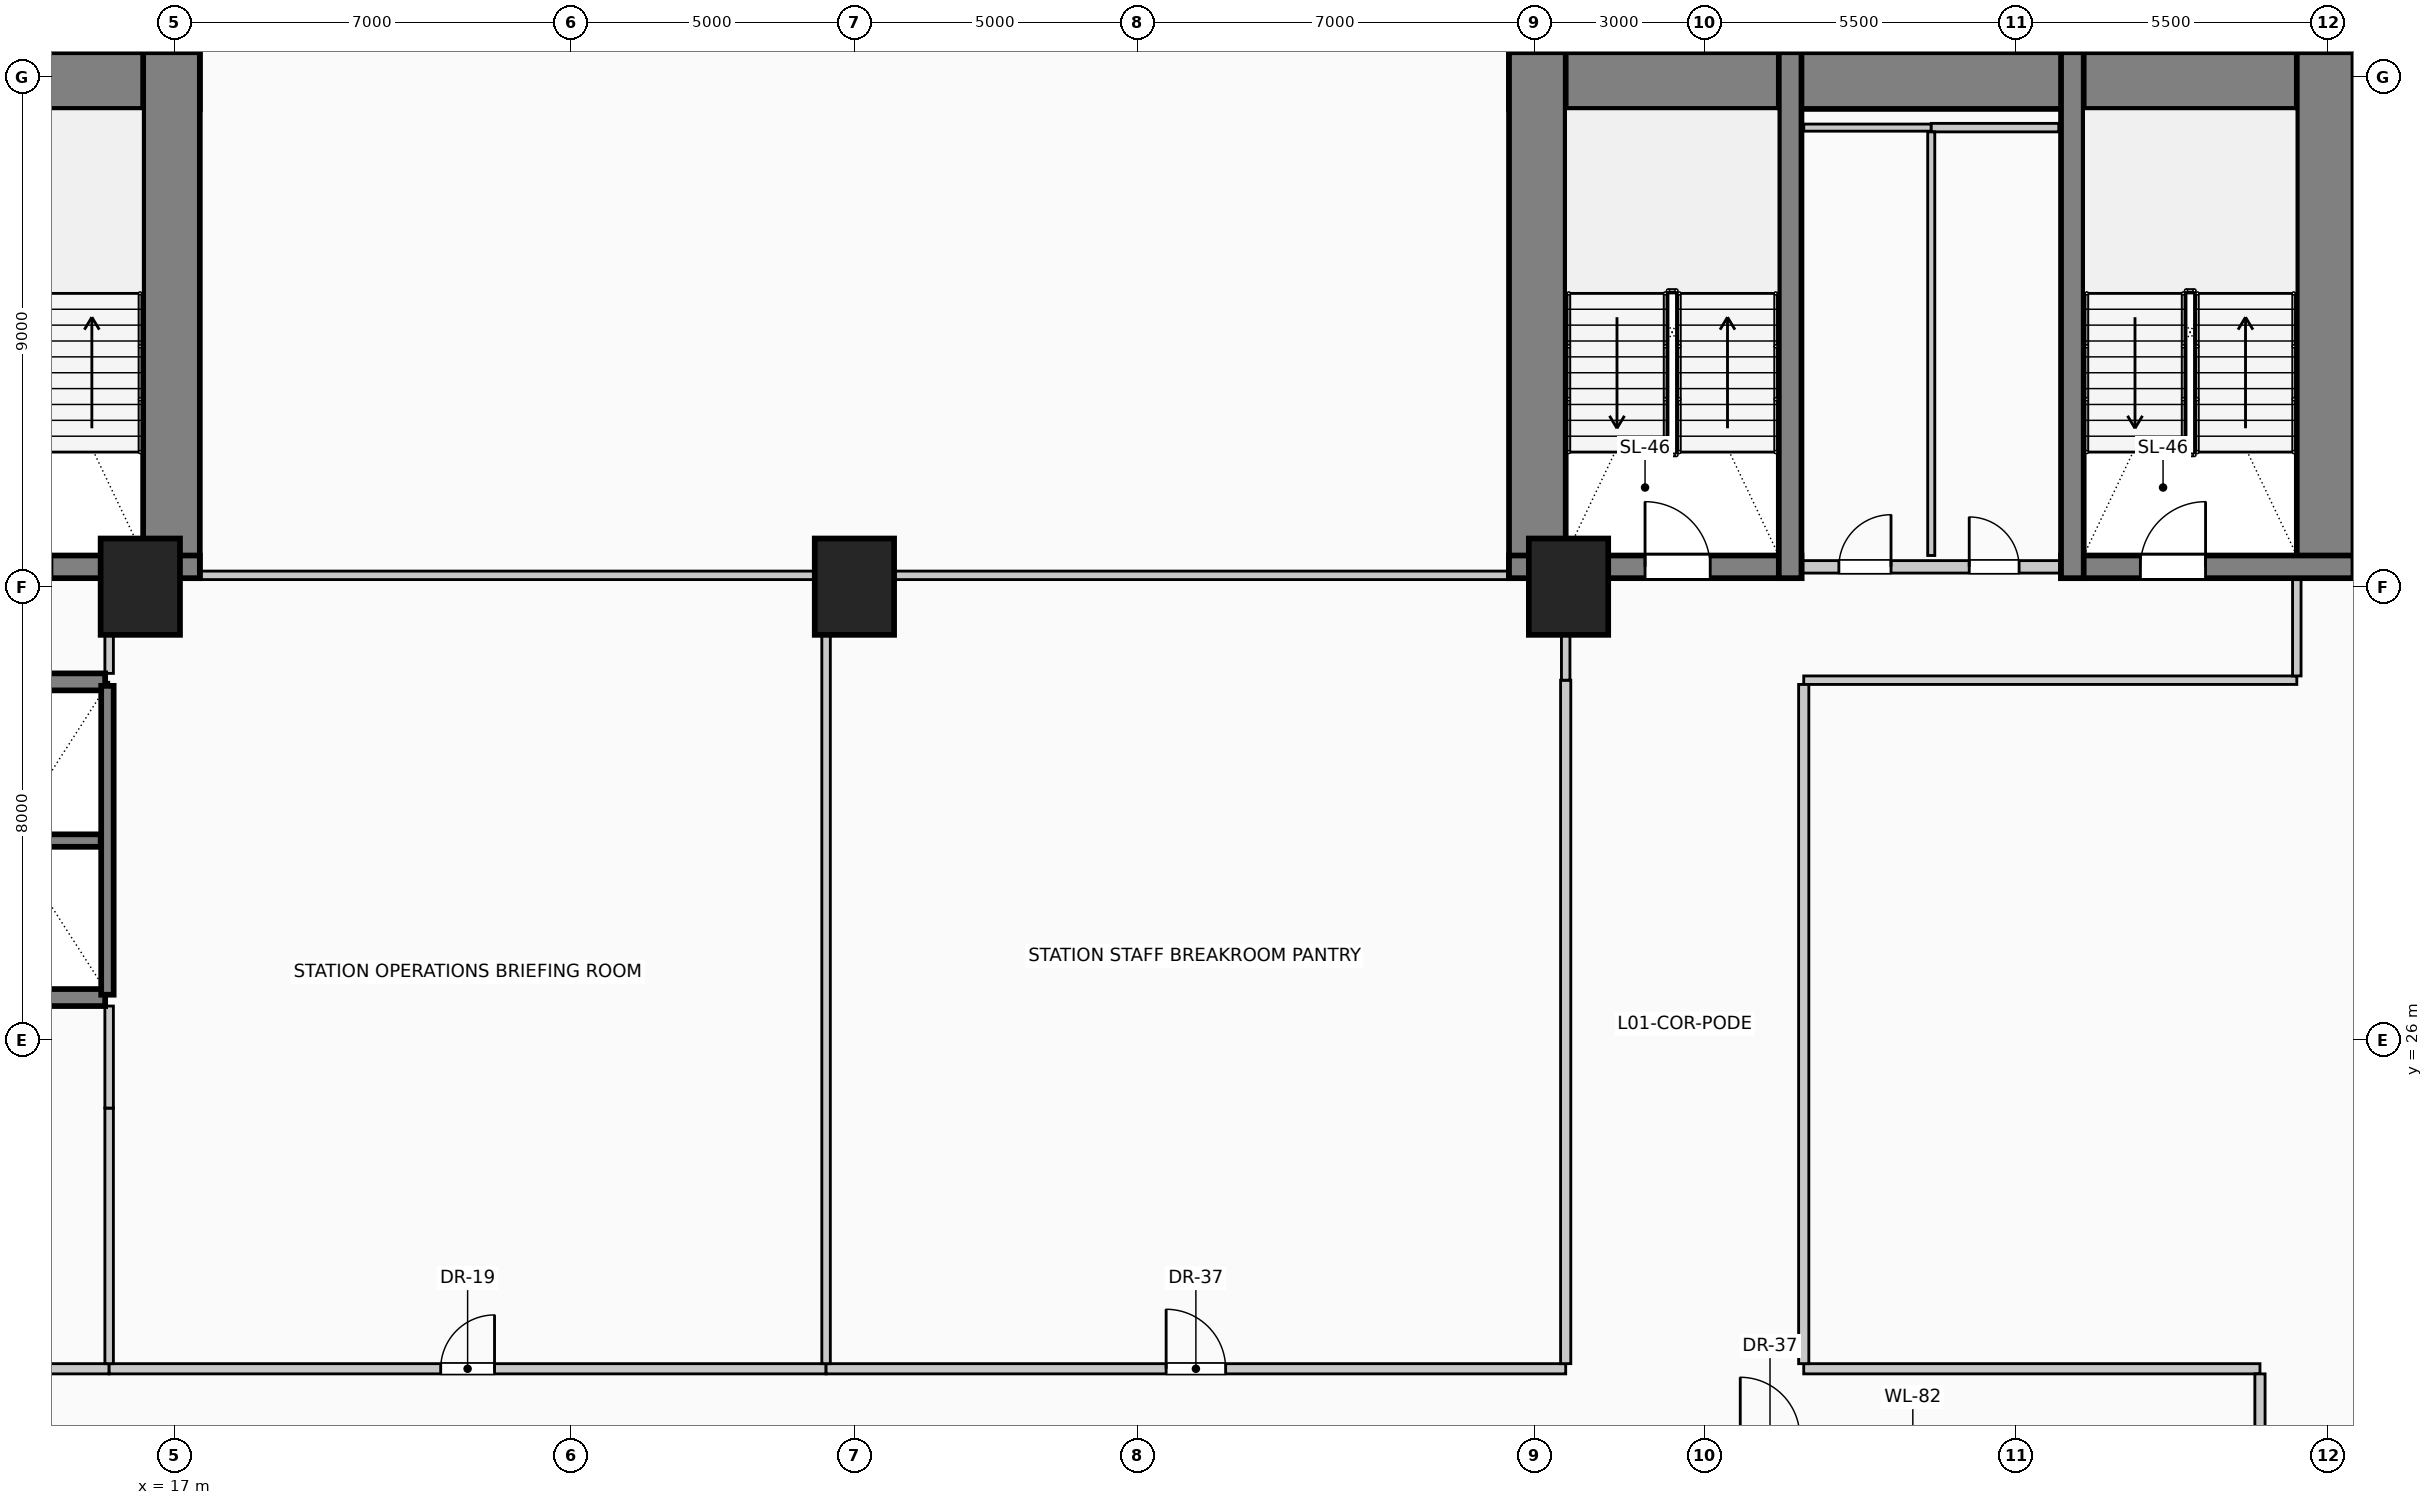
"""IFC4 building model, lengths in metres.
Left out: names, types, materials, properties, quantities, classifications, styles, units other than length and angle.
Written with IfcOpenShell. Run it as: python <this file> out.ifc"""

import sys

from ifc_helpers import new_model, si_unit, direction, frame, frame_2d, origin, origin_2d, place, context, subcontext, project, spatial, rectangle, extrude, element, fill, save


model = new_model("IFC4")
c1 = context("Model", 3, precision=1e-05, world=origin(), true_north=direction((0.0, 1.0)))
c2 = subcontext(c1, "Body", "Model", "MODEL_VIEW")
j1 = project(units=[si_unit("LENGTHUNIT", "METRE"), si_unit("PLANEANGLEUNIT", "RADIAN")], contexts=[c1])
p1 = place(None, origin())
s1 = spatial("IfcSite", under=j1, at=p1, CompositionType="ELEMENT")
p2 = place(p1, origin())
s2 = spatial("IfcBuilding", under=s1, at=p2, CompositionType="ELEMENT")
p3 = place(p2, frame((0.0, 0.0, 5.4)))
s3 = spatial("IfcBuildingStorey", under=s2, at=p3, CompositionType="ELEMENT", Elevation=5.4)
p4 = place(p3, frame((2.55, 42.93, 0.0), z_axis=(0.0, 0.0, 1.0), x_axis=(1.0, 0.0, 0.0)))
e1 = element("IfcWall", 1, at=p4, inside=s3, PredefinedType="SHEAR", context=c2, shape_type="SweptSolid", body=[
    extrude(rectangle(XDim=14.9, YDim=1.0, at=frame_2d((7.45, 0.0))), origin(), (0.0, 0.0, 1.0), 4.05),
])
p5 = place(p3, frame((16.95, 34.15, 0.0), z_axis=(0.0, 0.0, 1.0), x_axis=(0.0, 1.0, 0.0)))
e2 = element("IfcWall", 2, at=p5, inside=s3, PredefinedType="SHEAR", context=c2, shape_type="SweptSolid", body=[
    extrude(rectangle(XDim=9.28, YDim=1.0, at=frame_2d((4.64, 0.0))), origin(), (0.0, 0.0, 1.0), 4.05),
])
p6 = place(p3, frame((12.29, 34.35, 0.0), z_axis=(0.0, 0.0, 1.0), x_axis=(1.0, 0.0, 0.0)))
e3 = element("IfcWall", 3, at=p6, inside=s3, PredefinedType="SHEAR", context=c2, shape_type="SweptSolid", body=[
    extrude(rectangle(XDim=5.16, YDim=0.4, at=frame_2d((2.58, 0.0))), origin(), (0.0, 0.0, 1.0), 4.05),
])
p7 = place(p6, frame((1.4, 0.0, 0.0)))
e4 = element("IfcOpeningElement", 4, at=p7, cuts=e3, PredefinedType="OPENING", context=c2, shape_type="SweptSolid", body=[
    extrude(rectangle(XDim=1.15, YDim=2.2, at=frame_2d((0.575, 1.1))), frame((0.0, 0.21, 0.0), z_axis=(0.0, -1.0, 0.0), x_axis=(1.0, 0.0, 0.0)), (0.0, 0.0, 1.0), 0.42),
])
p8 = place(p3, frame((40.55, 42.93, 0.0), z_axis=(0.0, 0.0, 1.0), x_axis=(1.0, 0.0, 0.0)))
e5 = element("IfcWall", 5, at=p8, inside=s3, PredefinedType="SHEAR", context=c2, shape_type="SweptSolid", body=[
    extrude(rectangle(XDim=14.9, YDim=1.0, at=frame_2d((7.45, 0.0))), origin(), (0.0, 0.0, 1.0), 4.05),
])
for number, where, z_axis, x_axis in (
    (6, (41.05, 34.15, 0.0), (0.0, 0.0, 1.0), (0.0, 1.0, 0.0)),
    (7, (54.95, 34.15, 0.0), (0.0, 0.0, 1.0), (0.0, 1.0, 0.0)),
):
    element("IfcWall", number, at=place(p3, frame(where, z_axis=z_axis, x_axis=x_axis)), inside=s3, PredefinedType="SHEAR", context=c2, shape_type="SweptSolid", body=[
        extrude(rectangle(XDim=9.28, YDim=1.0, at=frame_2d((4.64, 0.0))), origin(), (0.0, 0.0, 1.0), 4.05),
    ])
p9 = place(p3, frame((40.55, 34.35, 0.0), z_axis=(0.0, 0.0, 1.0), x_axis=(1.0, 0.0, 0.0)))
e8 = element("IfcWall", 8, at=p9, inside=s3, PredefinedType="SHEAR", context=c2, shape_type="SweptSolid", body=[
    extrude(rectangle(XDim=5.16, YDim=0.4, at=frame_2d((2.58, 0.0))), origin(), (0.0, 0.0, 1.0), 4.05),
])
p10 = place(p9, frame((2.4, 0.0, 0.0)))
e9 = element("IfcOpeningElement", 9, at=p10, cuts=e8, PredefinedType="OPENING", context=c2, shape_type="SweptSolid", body=[
    extrude(rectangle(XDim=1.15, YDim=2.2, at=frame_2d((0.575, 1.1))), frame((0.0, 0.21, 0.0), z_axis=(0.0, -1.0, 0.0), x_axis=(1.0, 0.0, 0.0)), (0.0, 0.0, 1.0), 0.42),
])
p11 = place(p3, frame((45.51, 34.15, 0.0), z_axis=(0.0, 0.0, 1.0), x_axis=(0.0, 1.0, 0.0)))
e10 = element("IfcWall", 10, at=p11, inside=s3, PredefinedType="SHEAR", context=c2, shape_type="SweptSolid", body=[
    extrude(rectangle(XDim=9.28, YDim=0.4, at=frame_2d((4.64, 0.0))), origin(), (0.0, 0.0, 1.0), 4.05),
])
p12 = place(p3, frame((50.29, 34.35, 0.0), z_axis=(0.0, 0.0, 1.0), x_axis=(1.0, 0.0, 0.0)))
e11 = element("IfcWall", 11, at=p12, inside=s3, PredefinedType="SHEAR", context=c2, shape_type="SweptSolid", body=[
    extrude(rectangle(XDim=5.16, YDim=0.4, at=frame_2d((2.58, 0.0))), origin(), (0.0, 0.0, 1.0), 4.05),
])
p13 = place(p12, frame((1.4, 0.0, 0.0)))
e12 = element("IfcOpeningElement", 12, at=p13, cuts=e11, PredefinedType="OPENING", context=c2, shape_type="SweptSolid", body=[
    extrude(rectangle(XDim=1.15, YDim=2.2, at=frame_2d((0.575, 1.1))), frame((0.0, 0.21, 0.0), z_axis=(0.0, -1.0, 0.0), x_axis=(1.0, 0.0, 0.0)), (0.0, 0.0, 1.0), 0.42),
])
p14 = place(p3, frame((50.49, 34.15, 0.0), z_axis=(0.0, 0.0, 1.0), x_axis=(0.0, 1.0, 0.0)))
e13 = element("IfcWall", 13, at=p14, inside=s3, PredefinedType="SHEAR", context=c2, shape_type="SweptSolid", body=[
    extrude(rectangle(XDim=9.28, YDim=0.4, at=frame_2d((4.64, 0.0))), origin(), (0.0, 0.0, 1.0), 4.05),
])
for number, where, z_axis, x_axis in (
    (14, (16.4, 34.0, 0.0), (0.0, 0.0, 1.0), (1.0, 0.0, 0.0)),
    (15, (29.0, 34.0, 0.0), (0.0, 0.0, 1.0), (1.0, 0.0, 0.0)),
    (16, (41.6, 34.0, 0.0), (0.0, 0.0, 1.0), (1.0, 0.0, 0.0)),
):
    element("IfcColumn", number, at=place(p3, frame(where, z_axis=z_axis, x_axis=x_axis)), inside=s3, PredefinedType="COLUMN", context=c2, shape_type="SweptSolid", body=[
        extrude(rectangle(XDim=1.4, YDim=1.7, at=origin_2d()), origin(), (0.0, 0.0, 1.0), 4.05),
    ])
for number, where, z_axis, x_axis in (
    (17, (15.78, 26.75, 0.0), (0.0, 0.0, 1.0), (-1.0, 0.0, 0.0)),
    (18, (14.0, 32.32, 0.0), (0.0, 0.0, 1.0), (1.0, 0.0, 0.0)),
):
    element("IfcWall", number, at=place(p3, frame(where, z_axis=z_axis, x_axis=x_axis)), inside=s3, PredefinedType="SOLIDWALL", context=c2, shape_type="SweptSolid", body=[
        extrude(rectangle(XDim=1.78, YDim=0.3, at=frame_2d((0.89, 0.0))), origin(), (0.0, 0.0, 1.0), 4.05),
    ])
p15 = place(p3, frame((15.82, 26.8, 0.0), z_axis=(0.0, 0.0, 1.0), x_axis=(0.0, 1.0, 0.0)))
e19 = element("IfcWall", 19, at=p15, inside=s3, PredefinedType="SOLIDWALL", context=c2, shape_type="SweptSolid", body=[
    extrude(rectangle(XDim=5.45, YDim=0.22, at=frame_2d((2.725, 0.0))), origin(), (0.0, 0.0, 1.0), 4.05),
])
p16 = place(p3, frame((12.3, 29.52, 0.0), z_axis=(0.0, 0.0, 1.0), x_axis=(1.0, 0.0, 0.0)))
e20 = element("IfcWall", 20, at=p16, inside=s3, PredefinedType="SOLIDWALL", context=c2, shape_type="SweptSolid", body=[
    extrude(rectangle(XDim=3.4, YDim=0.22, at=frame_2d((1.7, 0.0))), origin(), (0.0, 0.0, 1.0), 4.05),
])
p17 = place(p3, frame((45.72, 34.35, 0.0), z_axis=(0.0, 0.0, 1.0), x_axis=(1.0, 0.0, 0.0)))
e21 = element("IfcWall", 21, at=p17, inside=s3, PredefinedType="PARTITIONING", context=c2, shape_type="SweptSolid", body=[
    extrude(rectangle(XDim=4.56, YDim=0.22, at=frame_2d((2.28, 0.0))), origin(), (0.0, 0.0, 1.0), 2.695),
])
p18 = place(p17, frame((0.65, 0.0, 0.0)))
e22 = element("IfcOpeningElement", 22, at=p18, cuts=e21, PredefinedType="OPENING", context=c2, shape_type="SweptSolid", body=[
    extrude(rectangle(XDim=0.92, YDim=2.1, at=frame_2d((0.46, 1.05))), frame((0.0, 0.12, 0.0), z_axis=(0.0, -1.0, 0.0), x_axis=(1.0, 0.0, 0.0)), (0.0, 0.0, 1.0), 0.24),
])
p19 = place(p17, frame((2.95, 0.0, 0.0)))
e23 = element("IfcOpeningElement", 23, at=p19, cuts=e21, PredefinedType="OPENING", context=c2, shape_type="SweptSolid", body=[
    extrude(rectangle(XDim=0.88, YDim=2.1, at=frame_2d((0.44, 1.05))), frame((0.0, 0.12, 0.0), z_axis=(0.0, -1.0, 0.0), x_axis=(1.0, 0.0, 0.0)), (0.0, 0.0, 1.0), 0.24),
])
p20 = place(p3, frame((12.2, 20.2, 0.0), z_axis=(0.0, 0.0, 1.0), x_axis=(1.0, 0.0, 0.0)))
e24 = element("IfcWall", 24, at=p20, inside=s3, PredefinedType="PARTITIONING", context=c2, shape_type="SweptSolid", body=[
    extrude(rectangle(XDim=3.65, YDim=0.18, at=frame_2d((1.825, 0.0))), origin(), (0.0, 0.0, 1.0), 3.65),
])
p21 = place(p3, frame((15.85, 20.2, 0.0), z_axis=(0.0, 0.0, 1.0), x_axis=(1.0, 0.0, 0.0)))
e25 = element("IfcWall", 25, at=p21, inside=s3, PredefinedType="PARTITIONING", context=c2, shape_type="SweptSolid", body=[
    extrude(rectangle(XDim=12.65, YDim=0.18, at=frame_2d((6.325, 0.0))), origin(), (0.0, 0.0, 1.0), 3.65),
])
p22 = place(p21, frame((5.85, 0.0, 0.0)))
e26 = element("IfcOpeningElement", 26, at=p22, cuts=e25, PredefinedType="OPENING", context=c2, shape_type="SweptSolid", body=[
    extrude(rectangle(XDim=0.95, YDim=2.15, at=frame_2d((0.475, 1.075))), frame((0.0, 0.1, 0.0), z_axis=(0.0, -1.0, 0.0), x_axis=(1.0, 0.0, 0.0)), (0.0, 0.0, 1.0), 0.2),
])
p23 = place(p3, frame((28.5, 20.2, 0.0), z_axis=(0.0, 0.0, 1.0), x_axis=(1.0, 0.0, 0.0)))
e27 = element("IfcWall", 27, at=p23, inside=s3, PredefinedType="PARTITIONING", context=c2, shape_type="SweptSolid", body=[
    extrude(rectangle(XDim=13.05, YDim=0.18, at=frame_2d((6.525, 0.0))), origin(), (0.0, 0.0, 1.0), 3.65),
])
p24 = place(p23, frame((6.0, 0.0, 0.0)))
e28 = element("IfcOpeningElement", 28, at=p24, cuts=e27, PredefinedType="OPENING", context=c2, shape_type="SweptSolid", body=[
    extrude(rectangle(XDim=1.05, YDim=2.15, at=frame_2d((0.525, 1.075))), frame((0.0, 0.1, 0.0), z_axis=(0.0, -1.0, 0.0), x_axis=(1.0, 0.0, 0.0)), (0.0, 0.0, 1.0), 0.2),
])
p25 = place(p3, frame((45.75, 20.2, 0.0), z_axis=(0.0, 0.0, 1.0), x_axis=(1.0, 0.0, 0.0)))
e29 = element("IfcWall", 29, at=p25, inside=s3, PredefinedType="PARTITIONING", context=c2, shape_type="SweptSolid", body=[
    extrude(rectangle(XDim=8.05, YDim=0.18, at=frame_2d((4.025, 0.0))), origin(), (0.0, 0.0, 1.0), 3.65),
])
p26 = place(p3, frame((45.75, 32.35, 0.0), z_axis=(0.0, 0.0, 1.0), x_axis=(1.0, 0.0, 0.0)))
e30 = element("IfcWall", 30, at=p26, inside=s3, PredefinedType="PARTITIONING", context=c2, shape_type="SweptSolid", body=[
    extrude(rectangle(XDim=8.7, YDim=0.15, at=frame_2d((4.35, 0.0))), origin(), (0.0, 0.0, 1.0), 3.65),
])
for number, where, z_axis, x_axis in (
    (31, (17.45, 34.2, 0.0), (0.0, 0.0, 1.0), (1.0, 0.0, 0.0)),
    (32, (29.7, 34.2, 0.0), (0.0, 0.0, 1.0), (1.0, 0.0, 0.0)),
):
    element("IfcWall", number, at=place(p3, frame(where, z_axis=z_axis, x_axis=x_axis)), inside=s3, PredefinedType="PARTITIONING", context=c2, shape_type="SweptSolid", body=[
        extrude(rectangle(XDim=10.85, YDim=0.15, at=frame_2d((5.425, 0.0))), origin(), (0.0, 0.0, 1.0), 2.695),
    ])
p27 = place(p3, frame((45.75, 42.1, 0.0), z_axis=(0.0, 0.0, 1.0), x_axis=(1.0, 0.0, 0.0)))
e33 = element("IfcWall", 33, at=p27, inside=s3, PredefinedType="PARTITIONING", context=c2, shape_type="SweptSolid", body=[
    extrude(rectangle(XDim=2.25, YDim=0.125, at=frame_2d((1.125, 0.0))), origin(), (0.0, 0.0, 1.0), 3.65),
])
p28 = place(p3, frame((48.0, 42.1, 0.0), z_axis=(0.0, 0.0, 1.0), x_axis=(1.0, 0.0, 0.0)))
e34 = element("IfcWall", 34, at=p28, inside=s3, PredefinedType="PARTITIONING", context=c2, shape_type="SweptSolid", body=[
    extrude(rectangle(XDim=2.25, YDim=0.15, at=frame_2d((1.125, 0.0))), origin(), (0.0, 0.0, 1.0), 3.65),
])
p29 = place(p3, frame((15.85, 20.29, 0.0), z_axis=(0.0, 0.0, 1.0), x_axis=(0.0, 1.0, 0.0)))
e35 = element("IfcWall", 35, at=p29, inside=s3, PredefinedType="PARTITIONING", context=c2, shape_type="SweptSolid", body=[
    extrude(rectangle(XDim=4.51, YDim=0.15, at=frame_2d((2.255, 0.0))), origin(), (0.0, 0.0, 1.0), 3.65),
])
p30 = place(p3, frame((15.85, 24.8, 0.0), z_axis=(0.0, 0.0, 1.0), x_axis=(0.0, 1.0, 0.0)))
e36 = element("IfcWall", 36, at=p30, inside=s3, PredefinedType="PARTITIONING", context=c2, shape_type="SweptSolid", body=[
    extrude(rectangle(XDim=1.8, YDim=0.15, at=frame_2d((0.9, 0.0))), origin(), (0.0, 0.0, 1.0), 3.65),
])
p31 = place(p3, frame((15.85, 32.47, 0.0), z_axis=(0.0, 0.0, 1.0), x_axis=(0.0, 1.0, 0.0)))
e37 = element("IfcWall", 37, at=p31, inside=s3, PredefinedType="PARTITIONING", context=c2, shape_type="SweptSolid", body=[
    extrude(rectangle(XDim=0.68, YDim=0.15, at=frame_2d((0.34, 0.0))), origin(), (0.0, 0.0, 1.0), 3.65),
])
p32 = place(p3, frame((28.5, 20.29, 0.0), z_axis=(0.0, 0.0, 1.0), x_axis=(0.0, 1.0, 0.0)))
e38 = element("IfcWall", 38, at=p32, inside=s3, PredefinedType="PARTITIONING", context=c2, shape_type="SweptSolid", body=[
    extrude(rectangle(XDim=12.86, YDim=0.15, at=frame_2d((6.43, 0.0))), origin(), (0.0, 0.0, 1.0), 3.65),
])
p33 = place(p3, frame((41.55, 20.29, 0.0), z_axis=(0.0, 0.0, 1.0), x_axis=(0.0, 1.0, 0.0)))
e39 = element("IfcWall", 39, at=p33, inside=s3, PredefinedType="PARTITIONING", context=c2, shape_type="SweptSolid", body=[
    extrude(rectangle(XDim=12.06, YDim=0.18, at=frame_2d((6.03, 0.0))), origin(), (0.0, 0.0, 1.0), 2.695),
])
p34 = place(p3, frame((41.55, 32.35, 0.0), z_axis=(0.0, 0.0, 1.0), x_axis=(0.0, 1.0, 0.0)))
e40 = element("IfcWall", 40, at=p34, inside=s3, PredefinedType="PARTITIONING", context=c2, shape_type="SweptSolid", body=[
    extrude(rectangle(XDim=0.8, YDim=0.15, at=frame_2d((0.4, 0.0))), origin(), (0.0, 0.0, 1.0), 2.695),
])
p35 = place(p3, frame((45.75, 20.29, 0.0), z_axis=(0.0, 0.0, 1.0), x_axis=(0.0, 1.0, 0.0)))
e41 = element("IfcWall", 41, at=p35, inside=s3, PredefinedType="PARTITIONING", context=c2, shape_type="SweptSolid", body=[
    extrude(rectangle(XDim=11.985, YDim=0.18, at=frame_2d((5.992, 0.0))), origin(), (0.0, 0.0, 1.0), 3.65),
])
p36 = place(p3, frame((48.0, 34.55, 0.0), z_axis=(0.0, 0.0, 1.0), x_axis=(0.0, 1.0, 0.0)))
e42 = element("IfcWall", 42, at=p36, inside=s3, PredefinedType="PARTITIONING", context=c2, shape_type="SweptSolid", body=[
    extrude(rectangle(XDim=7.475, YDim=0.125, at=frame_2d((3.737, 0.0))), origin(), (0.0, 0.0, 1.0), 3.65),
])
p37 = place(p3, frame((53.8, 19.09, 0.0), z_axis=(0.0, 0.0, 1.0), x_axis=(0.0, 1.0, 0.0)))
e43 = element("IfcWall", 43, at=p37, inside=s3, PredefinedType="PARTITIONING", context=c2, shape_type="SweptSolid", body=[
    extrude(rectangle(XDim=1.02, YDim=0.18, at=frame_2d((0.51, 0.0))), origin(), (0.0, 0.0, 1.0), 3.65),
])
p38 = place(p3, frame((54.45, 32.425, 0.0), z_axis=(0.0, 0.0, 1.0), x_axis=(0.0, 1.0, 0.0)))
e44 = element("IfcWall", 44, at=p38, inside=s3, PredefinedType="PARTITIONING", context=c2, shape_type="SweptSolid", body=[
    extrude(rectangle(XDim=1.725, YDim=0.15, at=frame_2d((0.862, 0.0))), origin(), (0.0, 0.0, 1.0), 3.65),
])
p39 = place(p10, origin())
e45 = element("IfcDoor", 45, at=p39, inside=s3, OperationType="SINGLE_SWING_LEFT", PredefinedType="DOOR", context=c2, shape_type="SweptSolid", body=[
    extrude(rectangle(XDim=1.15, YDim=2.2, at=frame_2d((0.575, 1.1))), frame((0.0, 0.025, 0.0), z_axis=(0.0, -1.0, 0.0), x_axis=(1.0, 0.0, 0.0)), (0.0, 0.0, 1.0), 0.05),
])
fill(e9, e45)
p40 = place(p18, origin())
e46 = element("IfcDoor", 46, at=p40, inside=s3, OperationType="SINGLE_SWING_RIGHT", PredefinedType="DOOR", context=c2, shape_type="SweptSolid", body=[
    extrude(rectangle(XDim=0.92, YDim=2.1, at=frame_2d((0.46, 1.05))), frame((0.0, 0.025, 0.0), z_axis=(0.0, -1.0, 0.0), x_axis=(1.0, 0.0, 0.0)), (0.0, 0.0, 1.0), 0.05),
])
fill(e22, e46)
p41 = place(p19, origin())
e47 = element("IfcDoor", 47, at=p41, inside=s3, OperationType="SINGLE_SWING_LEFT", PredefinedType="DOOR", context=c2, shape_type="SweptSolid", body=[
    extrude(rectangle(XDim=0.88, YDim=2.1, at=frame_2d((0.44, 1.05))), frame((0.0, 0.025, 0.0), z_axis=(0.0, -1.0, 0.0), x_axis=(1.0, 0.0, 0.0)), (0.0, 0.0, 1.0), 0.05),
])
fill(e23, e47)
p42 = place(p13, origin())
e48 = element("IfcDoor", 48, at=p42, inside=s3, OperationType="SINGLE_SWING_RIGHT", PredefinedType="DOOR", context=c2, shape_type="SweptSolid", body=[
    extrude(rectangle(XDim=1.15, YDim=2.2, at=frame_2d((0.575, 1.1))), frame((0.0, 0.025, 0.0), z_axis=(0.0, -1.0, 0.0), x_axis=(1.0, 0.0, 0.0)), (0.0, 0.0, 1.0), 0.05),
])
fill(e12, e48)
p43 = place(p22, origin())
e49 = element("IfcDoor", 49, at=p43, inside=s3, OperationType="SINGLE_SWING_RIGHT", PredefinedType="DOOR", context=c2, shape_type="SweptSolid", body=[
    extrude(rectangle(XDim=0.95, YDim=2.15, at=frame_2d((0.475, 1.075))), frame((0.0, 0.025, 0.0), z_axis=(0.0, -1.0, 0.0), x_axis=(1.0, 0.0, 0.0)), (0.0, 0.0, 1.0), 0.05),
])
fill(e26, e49)
p44 = place(p24, origin())
e50 = element("IfcDoor", 50, at=p44, inside=s3, OperationType="SINGLE_SWING_LEFT", PredefinedType="DOOR", context=c2, shape_type="SweptSolid", body=[
    extrude(rectangle(XDim=1.05, YDim=2.15, at=frame_2d((0.525, 1.075))), frame((0.0, 0.025, 0.0), z_axis=(0.0, -1.0, 0.0), x_axis=(1.0, 0.0, 0.0)), (0.0, 0.0, 1.0), 0.05),
])
fill(e28, e50)
save(model, sys.argv[1])
